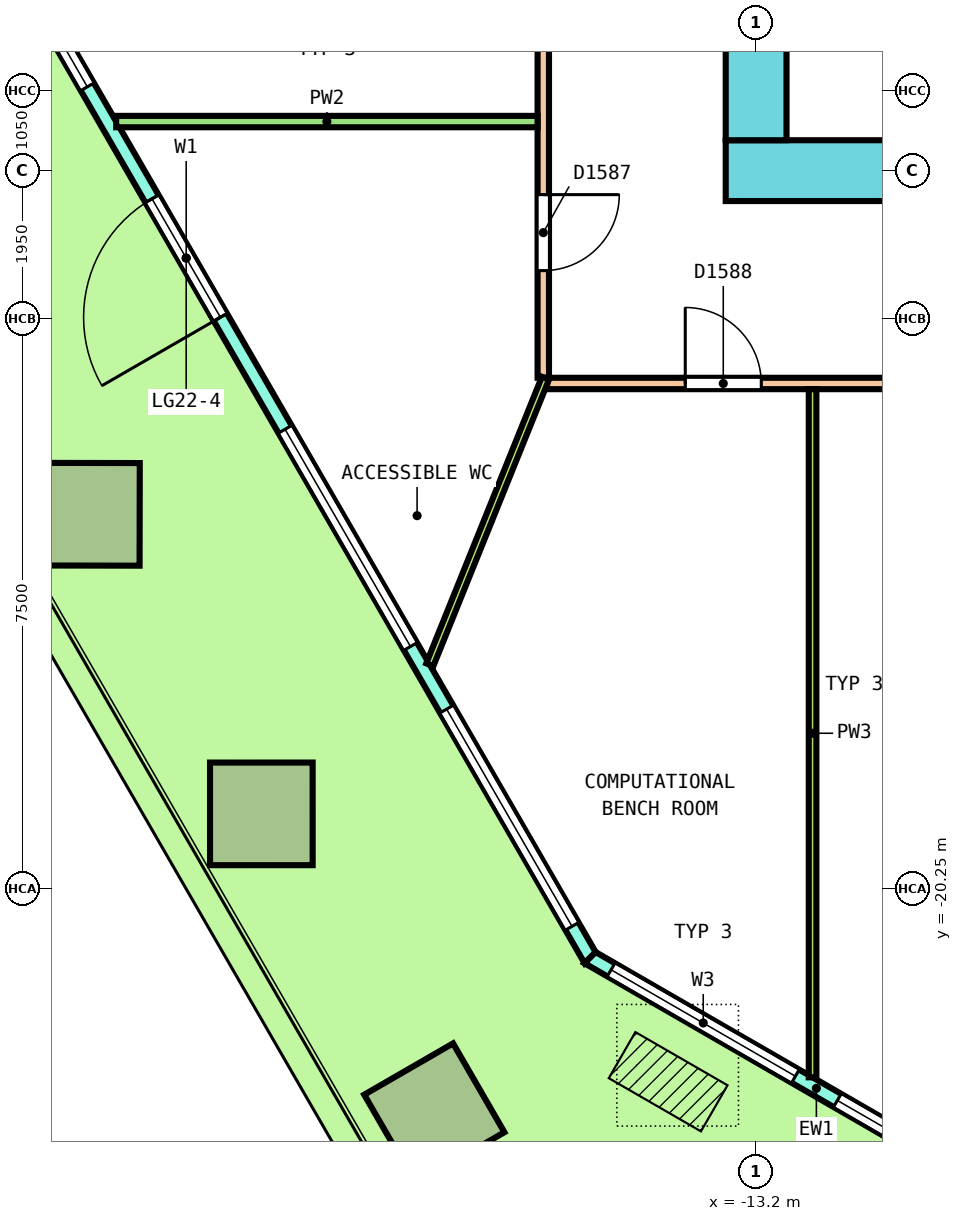
"""IFC4 building model, lengths in metres.
Left out: names, types, materials, properties, quantities, classifications, styles, units other than length and angle.
Written with IfcOpenShell. Run it as: python <this file> out.ifc"""

import sys

from ifc_helpers import new_model, si_unit, direction, frame, frame_2d, origin, origin_2d, place, context, subcontext, project, spatial, polyline, rectangle, outline, extrude, element, fill, save


model = new_model("IFC4")
c1 = context("Model", 3, precision=1e-05, world=origin(), true_north=direction((0.0, 1.0)))
c2 = subcontext(c1, "Body", "Model", "MODEL_VIEW")
j1 = project(units=[si_unit("LENGTHUNIT", "METRE"), si_unit("PLANEANGLEUNIT", "RADIAN")], contexts=[c1])
p1 = place(None, origin())
s1 = spatial("IfcSite", under=j1, at=p1, CompositionType="ELEMENT")
p2 = place(p1, origin())
s2 = spatial("IfcBuilding", under=s1, at=p2, CompositionType="ELEMENT")
p3 = place(p2, frame((0.0, 0.0, 102.8)))
s3 = spatial("IfcBuildingStorey", under=s2, at=p3, CompositionType="ELEMENT", Elevation=102.8)
p4 = place(p3, frame((-21.985, -15.321, 0.0), z_axis=(0.003616759812, -0.006269050341, 0.999973808685), x_axis=(0.498177152713, -0.867045063843, -0.007237525818)))
e1 = element("IfcColumn", 1, at=p4, inside=s3, PredefinedType="COLUMN", context=c2, shape_type="SweptSolid", body=[
    extrude(rectangle(XDim=1.35, YDim=1.35, at=origin_2d()), origin(), (0.0, 0.0, 1.0), 4.05),
])
p5 = place(p3, frame((-19.709, -19.262, 0.0), z_axis=(0.010908253887, -0.018863444567, 0.99976256204), x_axis=(0.500638377412, -0.865382225109, -0.021790354016)))
e2 = element("IfcColumn", 2, at=p5, inside=s3, PredefinedType="COLUMN", context=c2, shape_type="SweptSolid", body=[
    extrude(rectangle(XDim=1.35, YDim=1.35, at=origin_2d()), origin(), (0.0, 0.0, 1.0), 4.051),
])
p6 = place(p3, frame((-17.434, -23.204, 0.0), z_axis=(0.018132630042, -0.031385715123, 0.999342856388), x_axis=(0.865884970752, -0.499257274245, -0.031390946777)))
e3 = element("IfcColumn", 3, at=p6, inside=s3, PredefinedType="COLUMN", context=c2, shape_type="SweptSolid", body=[
    extrude(rectangle(XDim=1.35, YDim=1.35, at=origin_2d()), origin(), (0.0, 0.0, 1.0), 4.053),
])
p7 = place(p3, frame((-26.012, -2.746, 0.0), z_axis=(0.0, 0.0, 1.0), x_axis=(0.499998188434, -0.86602644969, 0.0)))
e4 = element("IfcWall", 4, at=p7, inside=s3, PredefinedType="SOLIDWALL", context=c2, shape_type="SweptSolid", body=[
    extrude(outline(polyline([(-0.027, -0.1), (0.988, -0.1), (2.003, -0.1), (3.017, -0.1), (4.032, -0.1), (5.047, -0.1), (6.062, -0.1), (7.076, -0.1), (8.091, -0.1), (9.106, -0.1), (10.121, -0.1), (11.135, -0.1), (12.15, -0.1), (13.165, -0.1), (14.179, -0.1), (15.194, -0.1), (16.209, -0.1), (17.224, -0.1), (18.239, -0.1), (19.253, -0.1), (20.268, -0.1), (21.283, -0.1), (21.229, 0.1), (20.219, 0.1), (19.21, 0.1), (18.2, 0.1), (17.19, 0.1), (16.181, 0.1), (15.171, 0.1), (14.162, 0.1), (13.152, 0.1), (12.142, 0.1), (11.133, 0.1), (10.123, 0.1), (9.114, 0.1), (8.104, 0.1), (7.094, 0.1), (6.085, 0.1), (5.075, 0.1), (4.065, 0.1), (3.056, 0.1), (2.046, 0.1), (1.036, 0.1), (0.027, 0.1), (-0.027, -0.1)])), origin(), (0.0, 0.0, 1.0), 4.1),
])
p8 = place(p7, frame((0.476, 0.0, 0.1)))
e5 = element("IfcOpeningElement", 5, at=p8, cuts=e4, PredefinedType="OPENING", context=c2, shape_type="SweptSolid", body=[
    extrude(rectangle(XDim=3.3, YDim=2.9, at=frame_2d((1.65, 1.45))), frame((0.0, 0.11, 0.0), z_axis=(0.0, -1.0, 0.0), x_axis=(1.0, 0.0, 0.0)), (0.0, 0.0, 1.0), 0.22),
])
p9 = place(p7, frame((4.727, 0.0, 0.1)))
e6 = element("IfcOpeningElement", 6, at=p9, cuts=e4, PredefinedType="OPENING", context=c2, shape_type="SweptSolid", body=[
    extrude(rectangle(XDim=3.3, YDim=2.9, at=frame_2d((1.65, 1.45))), frame((0.0, 0.11, 0.0), z_axis=(0.0, -1.0, 0.0), x_axis=(1.0, 0.0, 0.0)), (0.0, 0.0, 1.0), 0.22),
])
p10 = place(p7, frame((9.728, 0.0, 0.0)))
e7 = element("IfcOpeningElement", 7, at=p10, cuts=e4, PredefinedType="OPENING", context=c2, shape_type="SweptSolid", body=[
    extrude(rectangle(XDim=1.8, YDim=2.4, at=frame_2d((0.9, 1.2))), frame((0.0, 0.11, 0.0), z_axis=(0.0, -1.0, 0.0), x_axis=(1.0, 0.0, 0.0)), (0.0, 0.0, 1.0), 0.22),
])
p11 = place(p7, frame((9.728, 0.0, 2.55)))
e8 = element("IfcOpeningElement", 8, at=p11, cuts=e4, PredefinedType="OPENING", context=c2, shape_type="SweptSolid", body=[
    extrude(rectangle(XDim=1.8, YDim=0.45, at=frame_2d((0.9, 0.225))), frame((0.0, 0.11, 0.0), z_axis=(0.0, -1.0, 0.0), x_axis=(1.0, 0.0, 0.0)), (0.0, 0.0, 1.0), 0.22),
])
p12 = place(p7, frame((13.229, 0.0, 0.1)))
e9 = element("IfcOpeningElement", 9, at=p12, cuts=e4, PredefinedType="OPENING", context=c2, shape_type="SweptSolid", body=[
    extrude(rectangle(XDim=3.3, YDim=2.9, at=frame_2d((1.65, 1.45))), frame((0.0, 0.11, 0.0), z_axis=(0.0, -1.0, 0.0), x_axis=(1.0, 0.0, 0.0)), (0.0, 0.0, 1.0), 0.22),
])
p13 = place(p7, frame((17.48, 0.0, 0.1)))
e10 = element("IfcOpeningElement", 10, at=p13, cuts=e4, PredefinedType="OPENING", context=c2, shape_type="SweptSolid", body=[
    extrude(rectangle(XDim=3.3, YDim=2.9, at=frame_2d((1.65, 1.45))), frame((0.0, 0.11, 0.0), z_axis=(0.0, -1.0, 0.0), x_axis=(1.0, 0.0, 0.0)), (0.0, 0.0, 1.0), 0.22),
])
p14 = place(p3, frame((-15.384, -21.154, 0.0), z_axis=(0.0, 0.0, 1.0), x_axis=(0.866029458321, -0.49999297727, 0.0)))
e11 = element("IfcWall", 11, at=p14, inside=s3, PredefinedType="SOLIDWALL", context=c2, shape_type="SweptSolid", body=[
    extrude(outline(polyline([(-0.027, -0.1), (1.128, -0.1), (2.282, -0.1), (3.437, -0.1), (4.592, -0.1), (5.747, -0.1), (6.901, -0.1), (6.848, 0.1), (5.711, 0.1), (4.574, 0.1), (3.437, 0.1), (2.301, 0.1), (1.164, 0.1), (0.027, 0.1), (-0.027, -0.1)])), origin(), (0.0, 0.0, 1.0), 4.1),
])
p15 = place(p14, frame((0.319, 0.0, 0.1)))
e12 = element("IfcOpeningElement", 12, at=p15, cuts=e11, PredefinedType="OPENING", context=c2, shape_type="SweptSolid", body=[
    extrude(rectangle(XDim=2.8, YDim=2.9, at=frame_2d((1.4, 1.45))), frame((0.0, 0.11, 0.0), z_axis=(0.0, -1.0, 0.0), x_axis=(1.0, 0.0, 0.0)), (0.0, 0.0, 1.0), 0.22),
])
p16 = place(p14, frame((3.756, 0.0, 0.1)))
e13 = element("IfcOpeningElement", 13, at=p16, cuts=e11, PredefinedType="OPENING", context=c2, shape_type="SweptSolid", body=[
    extrude(rectangle(XDim=2.8, YDim=2.9, at=frame_2d((1.4, 1.45))), frame((0.0, 0.11, 0.0), z_axis=(0.0, -1.0, 0.0), x_axis=(1.0, 0.0, 0.0)), (0.0, 0.0, 1.0), 0.22),
])
p17 = place(p3, frame((-13.6, -10.8, 0.0), z_axis=(0.0, 0.0, 1.0), x_axis=(1.0, 0.0, 0.0)))
e14 = element("IfcWall", 14, at=p17, inside=s3, PredefinedType="SHEAR", context=c2, shape_type="SweptSolid", body=[
    extrude(rectangle(XDim=27.2, YDim=0.8, at=frame_2d((13.6, 0.0))), origin(), (0.0, 0.0, 1.0), 4.1),
])
p18 = place(p17, frame((2.333, 0.0, 0.0)))
e15 = element("IfcOpeningElement", 15, at=p18, cuts=e14, PredefinedType="OPENING", context=c2, shape_type="SweptSolid", body=[
    extrude(rectangle(XDim=1.0, YDim=2.1, at=frame_2d((0.5, 1.05))), frame((0.0, 0.41, 0.0), z_axis=(0.0, -1.0, 0.0), x_axis=(1.0, 0.0, 0.0)), (0.0, 0.0, 1.0), 0.82),
])
p19 = place(p17, frame((6.494, 0.0, 0.0)))
e16 = element("IfcOpeningElement", 16, at=p19, cuts=e14, PredefinedType="OPENING", context=c2, shape_type="SweptSolid", body=[
    extrude(rectangle(XDim=1.0, YDim=2.1, at=frame_2d((0.5, 1.05))), frame((0.0, 0.41, 0.0), z_axis=(0.0, -1.0, 0.0), x_axis=(1.0, 0.0, 0.0)), (0.0, 0.0, 1.0), 0.82),
])
p20 = place(p17, frame((10.623, 0.0, 0.0)))
e17 = element("IfcOpeningElement", 17, at=p20, cuts=e14, PredefinedType="OPENING", context=c2, shape_type="SweptSolid", body=[
    extrude(rectangle(XDim=1.0, YDim=2.1, at=frame_2d((0.5, 1.05))), frame((0.0, 0.41, 0.0), z_axis=(0.0, -1.0, 0.0), x_axis=(1.0, 0.0, 0.0)), (0.0, 0.0, 1.0), 0.82),
])
p21 = place(p17, frame((19.16, 0.0, 0.0)))
e18 = element("IfcOpeningElement", 18, at=p21, cuts=e14, PredefinedType="OPENING", context=c2, shape_type="SweptSolid", body=[
    extrude(rectangle(XDim=1.0, YDim=2.1, at=frame_2d((0.5, 1.05))), frame((0.0, 0.41, 0.0), z_axis=(0.0, -1.0, 0.0), x_axis=(1.0, 0.0, 0.0)), (0.0, 0.0, 1.0), 0.82),
])
p22 = place(p17, frame((21.856, 0.0, 0.0)))
e19 = element("IfcOpeningElement", 19, at=p22, cuts=e14, PredefinedType="OPENING", context=c2, shape_type="SweptSolid", body=[
    extrude(rectangle(XDim=1.0, YDim=2.1, at=frame_2d((0.5, 1.05))), frame((0.0, 0.41, 0.0), z_axis=(0.0, -1.0, 0.0), x_axis=(1.0, 0.0, 0.0)), (0.0, 0.0, 1.0), 0.82),
])
p23 = place(p17, frame((24.583, 0.0, 0.0)))
e20 = element("IfcOpeningElement", 20, at=p23, cuts=e14, PredefinedType="OPENING", context=c2, shape_type="SweptSolid", body=[
    extrude(rectangle(XDim=1.0, YDim=2.1, at=frame_2d((0.5, 1.05))), frame((0.0, 0.41, 0.0), z_axis=(0.0, -1.0, 0.0), x_axis=(1.0, 0.0, 0.0)), (0.0, 0.0, 1.0), 0.82),
])
p24 = place(p17, frame((15.15, 0.0, 0.0)))
e21 = element("IfcOpeningElement", 21, at=p24, cuts=e14, PredefinedType="OPENING", context=c2, shape_type="SweptSolid", body=[
    extrude(rectangle(XDim=1.2, YDim=2.1, at=frame_2d((0.6, 1.05))), frame((0.0, 0.41, 0.0), z_axis=(0.0, -1.0, 0.0), x_axis=(1.0, 0.0, 0.0)), (0.0, 0.0, 1.0), 0.82),
])
p25 = place(p3, frame((-13.2, -10.4, 0.0), z_axis=(0.0, 0.0, 1.0), x_axis=(0.0, 1.0, 0.0)))
e22 = element("IfcWall", 22, at=p25, inside=s3, PredefinedType="SHEAR", context=c2, shape_type="SweptSolid", body=[
    extrude(rectangle(XDim=20.8, YDim=0.8, at=frame_2d((10.4, 0.0))), origin(), (0.0, 0.0, 1.0), 4.1),
])
p26 = place(p25, frame((9.2, 0.0, 0.0)))
e23 = element("IfcOpeningElement", 23, at=p26, cuts=e22, PredefinedType="OPENING", context=c2, shape_type="SweptSolid", body=[
    extrude(rectangle(XDim=2.4, YDim=2.1, at=frame_2d((1.2, 1.05))), frame((0.0, 0.41, 0.0), z_axis=(0.0, -1.0, 0.0), x_axis=(1.0, 0.0, 0.0)), (0.0, 0.0, 1.0), 0.82),
])
p27 = place(p25, frame((16.1, 0.0, 0.0)))
e24 = element("IfcOpeningElement", 24, at=p27, cuts=e22, PredefinedType="OPENING", context=c2, shape_type="SweptSolid", body=[
    extrude(rectangle(XDim=1.2, YDim=2.1, at=frame_2d((0.6, 1.05))), frame((0.0, 0.41, 0.0), z_axis=(0.0, -1.0, 0.0), x_axis=(1.0, 0.0, 0.0)), (0.0, 0.0, 1.0), 0.82),
])
p28 = place(p25, frame((3.5, 0.0, 0.0)))
e25 = element("IfcOpeningElement", 25, at=p28, cuts=e22, PredefinedType="OPENING", context=c2, shape_type="SweptSolid", body=[
    extrude(rectangle(XDim=1.2, YDim=2.1, at=frame_2d((0.6, 1.05))), frame((0.0, 0.41, 0.0), z_axis=(0.0, -1.0, 0.0), x_axis=(1.0, 0.0, 0.0)), (0.0, 0.0, 1.0), 0.82),
])
p29 = place(p3, frame((-16.0, -13.525, 0.0), z_axis=(0.0, 0.0, 1.0), x_axis=(0.0, 1.0, 0.0)))
e26 = element("IfcWall", 26, at=p29, inside=s3, PredefinedType="PARTITIONING", context=c2, shape_type="SweptSolid", body=[
    extrude(rectangle(XDim=27.075, YDim=0.15, at=frame_2d((13.538, 0.0))), origin(), (0.0, 0.0, 1.0), 3.05),
])
p30 = place(p29, frame((24.881, 0.0, 0.0)))
e27 = element("IfcOpeningElement", 27, at=p30, cuts=e26, PredefinedType="OPENING", context=c2, shape_type="SweptSolid", body=[
    extrude(rectangle(XDim=1.0, YDim=2.1, at=frame_2d((0.5, 1.05))), frame((0.0, 0.085, 0.0), z_axis=(0.0, -1.0, 0.0), x_axis=(1.0, 0.0, 0.0)), (0.0, 0.0, 1.0), 0.17),
])
p31 = place(p29, frame((19.659, 0.0, 0.0)))
e28 = element("IfcOpeningElement", 28, at=p31, cuts=e26, PredefinedType="OPENING", context=c2, shape_type="SweptSolid", body=[
    extrude(rectangle(XDim=1.2, YDim=2.1, at=frame_2d((0.6, 1.05))), frame((0.0, 0.085, 0.0), z_axis=(0.0, -1.0, 0.0), x_axis=(1.0, 0.0, 0.0)), (0.0, 0.0, 1.0), 0.17),
])
p32 = place(p29, frame((14.873, 0.0, 0.0)))
e29 = element("IfcOpeningElement", 29, at=p32, cuts=e26, PredefinedType="OPENING", context=c2, shape_type="SweptSolid", body=[
    extrude(rectangle(XDim=1.2, YDim=2.1, at=frame_2d((0.6, 1.05))), frame((0.0, 0.085, 0.0), z_axis=(0.0, -1.0, 0.0), x_axis=(1.0, 0.0, 0.0)), (0.0, 0.0, 1.0), 0.17),
])
p33 = place(p29, frame((7.832, 0.0, 0.0)))
e30 = element("IfcOpeningElement", 30, at=p33, cuts=e26, PredefinedType="OPENING", context=c2, shape_type="SweptSolid", body=[
    extrude(rectangle(XDim=1.2, YDim=2.1, at=frame_2d((0.6, 1.05))), frame((0.0, 0.085, 0.0), z_axis=(0.0, -1.0, 0.0), x_axis=(1.0, 0.0, 0.0)), (0.0, 0.0, 1.0), 0.17),
])
p34 = place(p29, frame((1.409, 0.0, 0.0)))
e31 = element("IfcOpeningElement", 31, at=p34, cuts=e26, PredefinedType="OPENING", context=c2, shape_type="SweptSolid", body=[
    extrude(rectangle(XDim=1.0, YDim=2.1, at=frame_2d((0.5, 1.05))), frame((0.0, 0.085, 0.0), z_axis=(0.0, -1.0, 0.0), x_axis=(1.0, 0.0, 0.0)), (0.0, 0.0, 1.0), 0.17),
])
p35 = place(p3, frame((-15.95, -13.6, 0.0), z_axis=(0.0, 0.0, 1.0), x_axis=(1.0, 0.0, 0.0)))
e32 = element("IfcWall", 32, at=p35, inside=s3, PredefinedType="PARTITIONING", context=c2, shape_type="SweptSolid", body=[
    extrude(rectangle(XDim=31.9, YDim=0.15, at=frame_2d((15.95, 0.0))), origin(), (0.0, 0.0, 1.0), 3.05),
])
p36 = place(p35, frame((1.818, 0.0, 0.0)))
e33 = element("IfcOpeningElement", 33, at=p36, cuts=e32, PredefinedType="OPENING", context=c2, shape_type="SweptSolid", body=[
    extrude(rectangle(XDim=1.0, YDim=2.1, at=frame_2d((0.5, 1.05))), frame((0.0, 0.085, 0.0), z_axis=(0.0, -1.0, 0.0), x_axis=(1.0, 0.0, 0.0)), (0.0, 0.0, 1.0), 0.17),
])
p37 = place(p35, frame((7.655, 0.0, 0.0)))
e34 = element("IfcOpeningElement", 34, at=p37, cuts=e32, PredefinedType="OPENING", context=c2, shape_type="SweptSolid", body=[
    extrude(rectangle(XDim=1.0, YDim=2.1, at=frame_2d((0.5, 1.05))), frame((0.0, 0.085, 0.0), z_axis=(0.0, -1.0, 0.0), x_axis=(1.0, 0.0, 0.0)), (0.0, 0.0, 1.0), 0.17),
])
p38 = place(p35, frame((12.188, 0.0, 0.0)))
e35 = element("IfcOpeningElement", 35, at=p38, cuts=e32, PredefinedType="OPENING", context=c2, shape_type="SweptSolid", body=[
    extrude(rectangle(XDim=1.0, YDim=2.1, at=frame_2d((0.5, 1.05))), frame((0.0, 0.085, 0.0), z_axis=(0.0, -1.0, 0.0), x_axis=(1.0, 0.0, 0.0)), (0.0, 0.0, 1.0), 0.17),
])
p39 = place(p35, frame((17.241, 0.0, 0.0)))
e36 = element("IfcOpeningElement", 36, at=p39, cuts=e32, PredefinedType="OPENING", context=c2, shape_type="SweptSolid", body=[
    extrude(rectangle(XDim=1.2, YDim=2.1, at=frame_2d((0.6, 1.05))), frame((0.0, 0.085, 0.0), z_axis=(0.0, -1.0, 0.0), x_axis=(1.0, 0.0, 0.0)), (0.0, 0.0, 1.0), 0.17),
])
p40 = place(p35, frame((22.633, 0.0, 0.0)))
e37 = element("IfcOpeningElement", 37, at=p40, cuts=e32, PredefinedType="OPENING", context=c2, shape_type="SweptSolid", body=[
    extrude(rectangle(XDim=1.2, YDim=2.1, at=frame_2d((0.6, 1.05))), frame((0.0, 0.085, 0.0), z_axis=(0.0, -1.0, 0.0), x_axis=(1.0, 0.0, 0.0)), (0.0, 0.0, 1.0), 0.17),
])
p41 = place(p35, frame((27.807, 0.0, 0.0)))
e38 = element("IfcOpeningElement", 38, at=p41, cuts=e32, PredefinedType="OPENING", context=c2, shape_type="SweptSolid", body=[
    extrude(rectangle(XDim=1.2, YDim=2.1, at=frame_2d((0.6, 1.05))), frame((0.0, 0.085, 0.0), z_axis=(0.0, -1.0, 0.0), x_axis=(1.0, 0.0, 0.0)), (0.0, 0.0, 1.0), 0.17),
])
p42 = place(p3, frame((-21.619, -10.155, 0.0), z_axis=(0.0, 0.0, 1.0), x_axis=(1.0, 0.0, 0.0)))
e39 = element("IfcWall", 39, at=p42, inside=s3, PredefinedType="PARTITIONING", context=c2, shape_type="SweptSolid", body=[
    extrude(rectangle(XDim=5.544, YDim=0.15, at=frame_2d((2.772, 0.0))), origin(), (0.0, 0.0, 1.0), 3.05),
])
p43 = place(p3, frame((-17.493, -17.301, 0.0), z_axis=(0.0, 0.0, 1.0), x_axis=(0.374174102075, 0.927358475098, 0.0)))
e40 = element("IfcWall", 40, at=p43, inside=s3, PredefinedType="PARTITIONING", context=c2, shape_type="SweptSolid", body=[
    extrude(rectangle(XDim=4.066, YDim=0.1, at=frame_2d((2.033, 0.0))), origin(), (0.0, 0.0, 1.0), 3.05),
])
p44 = place(p3, frame((-12.457, -22.729, 0.0), z_axis=(0.0, 0.0, 1.0), x_axis=(0.0, 1.0, 0.0)))
e41 = element("IfcWall", 41, at=p44, inside=s3, PredefinedType="PARTITIONING", context=c2, shape_type="SweptSolid", body=[
    extrude(rectangle(XDim=9.053, YDim=0.1, at=frame_2d((4.527, 0.0))), origin(), (0.0, 0.0, 1.0), 3.05),
])
p45 = place(p9, origin())
e42 = element("IfcWindow", 42, at=p45, inside=s3, PartitioningType="SINGLE_PANEL", PredefinedType="WINDOW", context=c2, shape_type="SweptSolid", body=[
    extrude(rectangle(XDim=3.3, YDim=2.9, at=frame_2d((1.65, 1.45))), frame((0.0, 0.03, 0.0), z_axis=(0.0, -1.0, 0.0), x_axis=(1.0, 0.0, 0.0)), (0.0, 0.0, 1.0), 0.06),
])
fill(e6, e42)
p46 = place(p10, origin())
e43 = element("IfcDoor", 43, at=p46, inside=s3, OperationType="DOUBLE_DOOR_SINGLE_SWING", PredefinedType="DOOR", context=c2, shape_type="SweptSolid", body=[
    extrude(rectangle(XDim=1.8, YDim=2.4, at=frame_2d((0.9, 1.2))), frame((0.0, 0.025, 0.0), z_axis=(0.0, -1.0, 0.0), x_axis=(1.0, 0.0, 0.0)), (0.0, 0.0, 1.0), 0.05),
])
fill(e7, e43)
p47 = place(p11, origin())
e44 = element("IfcWindow", 44, at=p47, inside=s3, PartitioningType="SINGLE_PANEL", PredefinedType="WINDOW", context=c2, shape_type="SweptSolid", body=[
    extrude(rectangle(XDim=1.8, YDim=0.45, at=frame_2d((0.9, 0.225))), frame((0.0, 0.03, 0.0), z_axis=(0.0, -1.0, 0.0), x_axis=(1.0, 0.0, 0.0)), (0.0, 0.0, 1.0), 0.06),
])
fill(e8, e44)
p48 = place(p12, origin())
e45 = element("IfcWindow", 45, at=p48, inside=s3, PartitioningType="SINGLE_PANEL", PredefinedType="WINDOW", context=c2, shape_type="SweptSolid", body=[
    extrude(rectangle(XDim=3.3, YDim=2.9, at=frame_2d((1.65, 1.45))), frame((0.0, 0.03, 0.0), z_axis=(0.0, -1.0, 0.0), x_axis=(1.0, 0.0, 0.0)), (0.0, 0.0, 1.0), 0.06),
])
fill(e9, e45)
p49 = place(p13, origin())
e46 = element("IfcWindow", 46, at=p49, inside=s3, PartitioningType="SINGLE_PANEL", PredefinedType="WINDOW", context=c2, shape_type="SweptSolid", body=[
    extrude(rectangle(XDim=3.3, YDim=2.9, at=frame_2d((1.65, 1.45))), frame((0.0, 0.03, 0.0), z_axis=(0.0, -1.0, 0.0), x_axis=(1.0, 0.0, 0.0)), (0.0, 0.0, 1.0), 0.06),
])
fill(e10, e46)
p50 = place(p15, origin())
e47 = element("IfcWindow", 47, at=p50, inside=s3, PartitioningType="SINGLE_PANEL", PredefinedType="WINDOW", context=c2, shape_type="SweptSolid", body=[
    extrude(rectangle(XDim=2.8, YDim=2.9, at=frame_2d((1.4, 1.45))), frame((0.0, 0.03, 0.0), z_axis=(0.0, -1.0, 0.0), x_axis=(1.0, 0.0, 0.0)), (0.0, 0.0, 1.0), 0.06),
])
fill(e12, e47)
p51 = place(p16, origin())
e48 = element("IfcWindow", 48, at=p51, inside=s3, PartitioningType="SINGLE_PANEL", PredefinedType="WINDOW", context=c2, shape_type="SweptSolid", body=[
    extrude(rectangle(XDim=2.8, YDim=2.9, at=frame_2d((1.4, 1.45))), frame((0.0, 0.03, 0.0), z_axis=(0.0, -1.0, 0.0), x_axis=(1.0, 0.0, 0.0)), (0.0, 0.0, 1.0), 0.06),
])
fill(e13, e48)
p52 = place(p34, origin())
e49 = element("IfcDoor", 49, at=p52, inside=s3, OperationType="SINGLE_SWING_LEFT", PredefinedType="DOOR", context=c2, shape_type="SweptSolid", body=[
    extrude(rectangle(XDim=1.0, YDim=2.1, at=frame_2d((0.5, 1.05))), frame((0.0, 0.025, 0.0), z_axis=(0.0, -1.0, 0.0), x_axis=(1.0, 0.0, 0.0)), (0.0, 0.0, 1.0), 0.05),
])
fill(e31, e49)
p53 = place(p36, origin())
e50 = element("IfcDoor", 50, at=p53, inside=s3, OperationType="SINGLE_SWING_LEFT", PredefinedType="DOOR", context=c2, shape_type="SweptSolid", body=[
    extrude(rectangle(XDim=1.0, YDim=2.1, at=frame_2d((0.5, 1.05))), frame((0.0, 0.025, 0.0), z_axis=(0.0, -1.0, 0.0), x_axis=(1.0, 0.0, 0.0)), (0.0, 0.0, 1.0), 0.05),
])
fill(e33, e50)
save(model, sys.argv[1])
